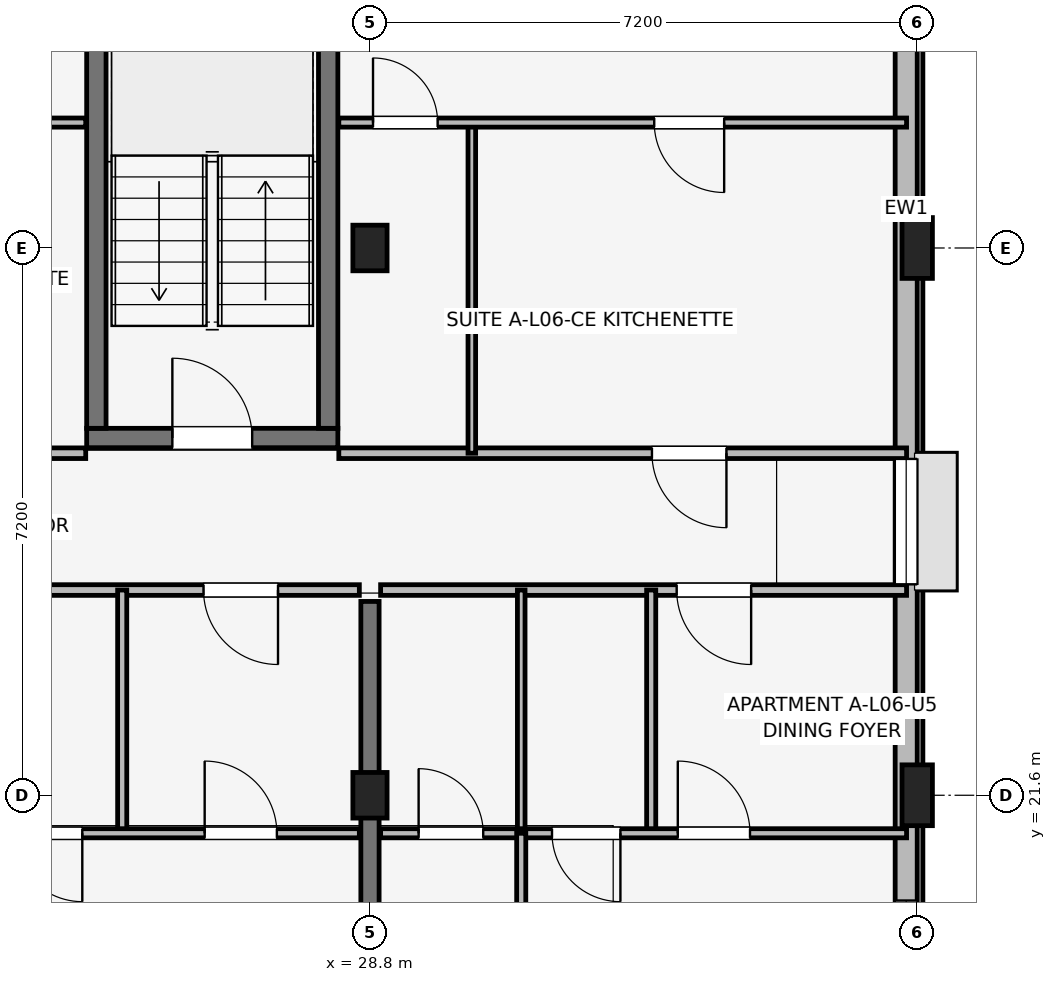
"""IFC4 building model, lengths in metres.
Left out: names, types, materials, properties, quantities, classifications, styles, units other than length and angle.
Written with IfcOpenShell. Run it as: python <this file> out.ifc"""

import sys

from ifc_helpers import new_model, si_unit, direction, frame, frame_2d, origin, origin_2d, place, context, subcontext, project, spatial, rectangle, extrude, element, fill, save


model = new_model("IFC4")
c1 = context("Model", 3, precision=1e-05, world=origin(), true_north=direction((0.0, 1.0)))
c2 = subcontext(c1, "Body", "Model", "MODEL_VIEW")
j1 = project(units=[si_unit("LENGTHUNIT", "METRE"), si_unit("PLANEANGLEUNIT", "RADIAN")], contexts=[c1])
p1 = place(None, origin())
s1 = spatial("IfcSite", under=j1, at=p1, CompositionType="ELEMENT")
p2 = place(p1, origin())
s2 = spatial("IfcBuilding", under=s1, at=p2, CompositionType="ELEMENT")
p3 = place(p2, frame((0.0, 0.0, 21.3)))
s3 = spatial("IfcBuildingStorey", under=s2, at=p3, CompositionType="ELEMENT", Elevation=21.3)
for number, where, z_axis, x_axis in (
    (1, (28.8, 21.6, 0.0), (0.0, 0.0, 1.0), (1.0, 0.0, 0.0)),
    (2, (28.8, 28.8, 0.0), (0.0, 0.0, 1.0), (1.0, 0.0, 0.0)),
):
    element("IfcColumn", number, at=place(p3, frame(where, z_axis=z_axis, x_axis=x_axis)), inside=s3, PredefinedType="COLUMN", context=c2, shape_type="SweptSolid", body=[
        extrude(rectangle(XDim=0.45, YDim=0.6, at=origin_2d()), origin(), (0.0, 0.0, 1.0), 3.15),
    ])
for number, where, z_axis, x_axis in (
    (3, (36.0, 21.6, 0.0), (0.0, 0.0, 1.0), (1.0, 0.0, 0.0)),
    (4, (36.0, 28.8, 0.0), (0.0, 0.0, 1.0), (1.0, 0.0, 0.0)),
):
    element("IfcColumn", number, at=place(p3, frame(where, z_axis=z_axis, x_axis=x_axis)), inside=s3, PredefinedType="COLUMN", context=c2, shape_type="SweptSolid", body=[
        extrude(rectangle(XDim=0.4, YDim=0.8, at=origin_2d()), origin(), (0.0, 0.0, 1.0), 3.15),
    ])
p4 = place(p3, frame((25.073, 26.3, 0.0), z_axis=(0.0, 0.0, 1.0), x_axis=(1.0, 0.0, 0.0)))
e5 = element("IfcWall", 5, at=p4, inside=s3, PredefinedType="SHEAR", context=c2, shape_type="SweptSolid", body=[
    extrude(rectangle(XDim=3.305, YDim=0.255, at=frame_2d((1.652, 0.0))), origin(), (0.0, 0.0, 1.0), 3.15),
])
p5 = place(p4, frame((1.127, 0.0, 0.0)))
e6 = element("IfcOpeningElement", 6, at=p5, cuts=e5, PredefinedType="OPENING", context=c2, shape_type="SweptSolid", body=[
    extrude(rectangle(XDim=1.05, YDim=2.12, at=frame_2d((0.525, 1.06))), frame((0.0, 0.137, 0.0), z_axis=(0.0, -1.0, 0.0), x_axis=(1.0, 0.0, 0.0)), (0.0, 0.0, 1.0), 0.275),
])
for number, where, z_axis, x_axis in (
    (7, (25.2, 26.427, 0.0), (0.0, 0.0, 1.0), (0.0, 1.0, 0.0)),
    (8, (28.25, 26.427, 0.0), (0.0, 0.0, 1.0), (0.0, 1.0, 0.0)),
):
    element("IfcWall", number, at=place(p3, frame(where, z_axis=z_axis, x_axis=x_axis)), inside=s3, PredefinedType="SHEAR", context=c2, shape_type="SweptSolid", body=[
        extrude(rectangle(XDim=6.295, YDim=0.255, at=frame_2d((3.147, 0.0))), origin(), (0.0, 0.0, 1.0), 3.15),
    ])
p6 = place(p3, frame((28.8, 14.75, 0.0), z_axis=(0.0, 0.0, 1.0), x_axis=(0.0, 1.0, 0.0)))
e9 = element("IfcWall", 9, at=p6, inside=s3, PredefinedType="SHEAR", context=c2, shape_type="SweptSolid", body=[
    extrude(rectangle(XDim=9.4, YDim=0.24, at=frame_2d((4.7, 0.0))), origin(), (0.0, 0.0, 1.0), 3.15),
])
p7 = place(p3, frame((35.855, 17.8, 0.0), z_axis=(0.0, 0.0, 1.0), x_axis=(0.0, 1.0, 0.0)))
e10 = element("IfcWall", 10, at=p7, inside=s3, PredefinedType="SOLIDWALL", context=c2, shape_type="SweptSolid", body=[
    extrude(rectangle(XDim=14.8, YDim=0.29, at=frame_2d((7.4, 0.0))), origin(), (0.0, 0.0, 1.0), 2.43),
])
p8 = place(p7, frame((6.575, 0.0, 1.05)))
e11 = element("IfcOpeningElement", 11, at=p8, cuts=e10, PredefinedType="OPENING", context=c2, shape_type="SweptSolid", body=[
    extrude(rectangle(XDim=1.65, YDim=1.15, at=frame_2d((0.825, 0.575))), frame((0.0, 0.155, 0.0), z_axis=(0.0, -1.0, 0.0), x_axis=(1.0, 0.0, 0.0)), (0.0, 0.0, 1.0), 0.31),
])
p9 = place(p7, frame((1.115, 0.0, 0.75)))
e12 = element("IfcOpeningElement", 12, at=p9, cuts=e10, PredefinedType="OPENING", context=c2, shape_type="SweptSolid", body=[
    extrude(rectangle(XDim=1.3, YDim=1.55, at=frame_2d((0.65, 0.775))), frame((0.0, 0.155, 0.0), z_axis=(0.0, -1.0, 0.0), x_axis=(1.0, 0.0, 0.0)), (0.0, 0.0, 1.0), 0.31),
])
p10 = place(p3, frame((21.74, 24.3, 0.0), z_axis=(0.0, 0.0, 1.0), x_axis=(1.0, 0.0, 0.0)))
e13 = element("IfcWall", 13, at=p10, inside=s3, PredefinedType="PARTITIONING", context=c2, shape_type="SweptSolid", body=[
    extrude(rectangle(XDim=6.92, YDim=0.14, at=frame_2d((3.46, 0.0))), origin(), (0.0, 0.0, 1.0), 2.38),
])
p11 = place(p10, frame((5.85, 0.0, 0.0), z_axis=(0.0, 0.0, 1.0), x_axis=(-1.0, 0.0, 0.0)))
e14 = element("IfcOpeningElement", 14, at=p11, cuts=e13, PredefinedType="OPENING", context=c2, shape_type="SweptSolid", body=[
    extrude(rectangle(XDim=0.98, YDim=2.1, at=frame_2d((0.49, 1.05))), frame((0.0, 0.08, 0.0), z_axis=(0.0, -1.0, 0.0), x_axis=(1.0, 0.0, 0.0)), (0.0, 0.0, 1.0), 0.16),
])
p12 = place(p3, frame((25.54, 21.1, 0.0), z_axis=(0.0, 0.0, 1.0), x_axis=(0.0, 1.0, 0.0)))
e15 = element("IfcWall", 15, at=p12, inside=s3, PredefinedType="PARTITIONING", context=c2, shape_type="SweptSolid", body=[
    extrude(rectangle(XDim=3.2, YDim=0.12, at=frame_2d((1.6, 0.0))), origin(), (0.0, 0.0, 1.0), 2.38),
])
p13 = place(p3, frame((21.74, 21.1, 0.0), z_axis=(0.0, 0.0, 1.0), x_axis=(1.0, 0.0, 0.0)))
e16 = element("IfcWall", 16, at=p13, inside=s3, PredefinedType="PARTITIONING", context=c2, shape_type="SweptSolid", body=[
    extrude(rectangle(XDim=6.92, YDim=0.12, at=frame_2d((3.46, 0.0))), origin(), (0.0, 0.0, 1.0), 2.38),
])
p14 = place(p13, frame((0.5, 0.0, 0.0)))
e17 = element("IfcOpeningElement", 17, at=p14, cuts=e16, PredefinedType="OPENING", context=c2, shape_type="SweptSolid", body=[
    extrude(rectangle(XDim=0.85, YDim=2.08, at=frame_2d((0.425, 1.04))), frame((0.0, 0.07, 0.0), z_axis=(0.0, -1.0, 0.0), x_axis=(1.0, 0.0, 0.0)), (0.0, 0.0, 1.0), 0.14),
])
p15 = place(p13, frame((3.275, 0.0, 0.0), z_axis=(0.0, 0.0, 1.0), x_axis=(-1.0, 0.0, 0.0)))
e18 = element("IfcOpeningElement", 18, at=p15, cuts=e16, PredefinedType="OPENING", context=c2, shape_type="SweptSolid", body=[
    extrude(rectangle(XDim=0.9, YDim=2.08, at=frame_2d((0.45, 1.04))), frame((0.0, 0.07, 0.0), z_axis=(0.0, -1.0, 0.0), x_axis=(1.0, 0.0, 0.0)), (0.0, 0.0, 1.0), 0.14),
])
p16 = place(p13, frame((4.885, 0.0, 0.0)))
e19 = element("IfcOpeningElement", 19, at=p16, cuts=e16, PredefinedType="OPENING", context=c2, shape_type="SweptSolid", body=[
    extrude(rectangle(XDim=0.95, YDim=2.08, at=frame_2d((0.475, 1.04))), frame((0.0, 0.07, 0.0), z_axis=(0.0, -1.0, 0.0), x_axis=(1.0, 0.0, 0.0)), (0.0, 0.0, 1.0), 0.14),
])
p17 = place(p3, frame((28.94, 24.3, 0.0), z_axis=(0.0, 0.0, 1.0), x_axis=(1.0, 0.0, 0.0)))
e20 = element("IfcWall", 20, at=p17, inside=s3, PredefinedType="PARTITIONING", context=c2, shape_type="SweptSolid", body=[
    extrude(rectangle(XDim=6.92, YDim=0.14, at=frame_2d((3.46, 0.0))), origin(), (0.0, 0.0, 1.0), 2.38),
])
p18 = place(p17, frame((4.875, 0.0, 0.0), z_axis=(0.0, 0.0, 1.0), x_axis=(-1.0, 0.0, 0.0)))
e21 = element("IfcOpeningElement", 21, at=p18, cuts=e20, PredefinedType="OPENING", context=c2, shape_type="SweptSolid", body=[
    extrude(rectangle(XDim=0.98, YDim=2.1, at=frame_2d((0.49, 1.05))), frame((0.0, 0.08, 0.0), z_axis=(0.0, -1.0, 0.0), x_axis=(1.0, 0.0, 0.0)), (0.0, 0.0, 1.0), 0.16),
])
p19 = place(p3, frame((30.79, 21.1, 0.0), z_axis=(0.0, 0.0, 1.0), x_axis=(0.0, 1.0, 0.0)))
e22 = element("IfcWall", 22, at=p19, inside=s3, PredefinedType="PARTITIONING", context=c2, shape_type="SweptSolid", body=[
    extrude(rectangle(XDim=3.2, YDim=0.1, at=frame_2d((1.6, 0.0))), origin(), (0.0, 0.0, 1.0), 2.38),
])
p20 = place(p3, frame((32.5, 21.1, 0.0), z_axis=(0.0, 0.0, 1.0), x_axis=(0.0, 1.0, 0.0)))
e23 = element("IfcWall", 23, at=p20, inside=s3, PredefinedType="PARTITIONING", context=c2, shape_type="SweptSolid", body=[
    extrude(rectangle(XDim=3.2, YDim=0.12, at=frame_2d((1.6, 0.0))), origin(), (0.0, 0.0, 1.0), 2.38),
])
p21 = place(p3, frame((28.94, 21.1, 0.0), z_axis=(0.0, 0.0, 1.0), x_axis=(1.0, 0.0, 0.0)))
e24 = element("IfcWall", 24, at=p21, inside=s3, PredefinedType="PARTITIONING", context=c2, shape_type="SweptSolid", body=[
    extrude(rectangle(XDim=6.92, YDim=0.12, at=frame_2d((3.46, 0.0))), origin(), (0.0, 0.0, 1.0), 2.38),
])
p22 = place(p21, frame((0.5, 0.0, 0.0)))
e25 = element("IfcOpeningElement", 25, at=p22, cuts=e24, PredefinedType="OPENING", context=c2, shape_type="SweptSolid", body=[
    extrude(rectangle(XDim=0.85, YDim=2.08, at=frame_2d((0.425, 1.04))), frame((0.0, 0.07, 0.0), z_axis=(0.0, -1.0, 0.0), x_axis=(1.0, 0.0, 0.0)), (0.0, 0.0, 1.0), 0.14),
])
p23 = place(p21, frame((3.155, 0.0, 0.0), z_axis=(0.0, 0.0, 1.0), x_axis=(-1.0, 0.0, 0.0)))
e26 = element("IfcOpeningElement", 26, at=p23, cuts=e24, PredefinedType="OPENING", context=c2, shape_type="SweptSolid", body=[
    extrude(rectangle(XDim=0.9, YDim=2.08, at=frame_2d((0.45, 1.04))), frame((0.0, 0.07, 0.0), z_axis=(0.0, -1.0, 0.0), x_axis=(1.0, 0.0, 0.0)), (0.0, 0.0, 1.0), 0.14),
])
p24 = place(p21, frame((3.91, 0.0, 0.0)))
e27 = element("IfcOpeningElement", 27, at=p24, cuts=e24, PredefinedType="OPENING", context=c2, shape_type="SweptSolid", body=[
    extrude(rectangle(XDim=0.95, YDim=2.08, at=frame_2d((0.475, 1.04))), frame((0.0, 0.07, 0.0), z_axis=(0.0, -1.0, 0.0), x_axis=(1.0, 0.0, 0.0)), (0.0, 0.0, 1.0), 0.14),
])
p25 = place(p3, frame((30.79, 14.7, 0.0), z_axis=(0.0, 0.0, 1.0), x_axis=(0.0, 1.0, 0.0)))
e28 = element("IfcWall", 28, at=p25, inside=s3, PredefinedType="PARTITIONING", context=c2, shape_type="SweptSolid", body=[
    extrude(rectangle(XDim=6.4, YDim=0.12, at=frame_2d((3.2, 0.0))), origin(), (0.0, 0.0, 1.0), 2.38),
])
p26 = place(p25, frame((3.65, 0.0, 0.0), z_axis=(0.0, 0.0, 1.0), x_axis=(-1.0, 0.0, 0.0)))
e29 = element("IfcOpeningElement", 29, at=p26, cuts=e28, PredefinedType="OPENING", context=c2, shape_type="SweptSolid", body=[
    extrude(rectangle(XDim=0.9, YDim=2.08, at=frame_2d((0.45, 1.04))), frame((0.0, 0.07, 0.0), z_axis=(0.0, -1.0, 0.0), x_axis=(1.0, 0.0, 0.0)), (0.0, 0.0, 1.0), 0.14),
])
p27 = place(p3, frame((21.34, 26.1, 0.0), z_axis=(0.0, 0.0, 1.0), x_axis=(1.0, 0.0, 0.0)))
e30 = element("IfcWall", 30, at=p27, inside=s3, PredefinedType="PARTITIONING", context=c2, shape_type="SweptSolid", body=[
    extrude(rectangle(XDim=3.72, YDim=0.14, at=frame_2d((1.86, 0.0))), origin(), (0.0, 0.0, 1.0), 2.38),
])
p28 = place(p27, frame((2.151, 0.0, 0.0)))
e31 = element("IfcOpeningElement", 31, at=p28, cuts=e30, PredefinedType="OPENING", context=c2, shape_type="SweptSolid", body=[
    extrude(rectangle(XDim=0.98, YDim=2.1, at=frame_2d((0.49, 1.05))), frame((0.0, 0.08, 0.0), z_axis=(0.0, -1.0, 0.0), x_axis=(1.0, 0.0, 0.0)), (0.0, 0.0, 1.0), 0.16),
])
p29 = place(p3, frame((21.34, 30.45, 0.0), z_axis=(0.0, 0.0, 1.0), x_axis=(1.0, 0.0, 0.0)))
e32 = element("IfcWall", 32, at=p29, inside=s3, PredefinedType="PARTITIONING", context=c2, shape_type="SweptSolid", body=[
    extrude(rectangle(XDim=3.72, YDim=0.12, at=frame_2d((1.86, 0.0))), origin(), (0.0, 0.0, 1.0), 2.38),
])
p30 = place(p29, frame((1.206, 0.0, 0.0), z_axis=(0.0, 0.0, 1.0), x_axis=(-1.0, 0.0, 0.0)))
e33 = element("IfcOpeningElement", 33, at=p30, cuts=e32, PredefinedType="OPENING", context=c2, shape_type="SweptSolid", body=[
    extrude(rectangle(XDim=0.85, YDim=2.08, at=frame_2d((0.425, 1.04))), frame((0.0, 0.07, 0.0), z_axis=(0.0, -1.0, 0.0), x_axis=(1.0, 0.0, 0.0)), (0.0, 0.0, 1.0), 0.14),
])
p31 = place(p29, frame((2.181, 0.0, 0.0)))
e34 = element("IfcOpeningElement", 34, at=p31, cuts=e32, PredefinedType="OPENING", context=c2, shape_type="SweptSolid", body=[
    extrude(rectangle(XDim=0.92, YDim=2.08, at=frame_2d((0.46, 1.04))), frame((0.0, 0.07, 0.0), z_axis=(0.0, -1.0, 0.0), x_axis=(1.0, 0.0, 0.0)), (0.0, 0.0, 1.0), 0.14),
])
p32 = place(p3, frame((28.39, 26.1, 0.0), z_axis=(0.0, 0.0, 1.0), x_axis=(1.0, 0.0, 0.0)))
e35 = element("IfcWall", 35, at=p32, inside=s3, PredefinedType="PARTITIONING", context=c2, shape_type="SweptSolid", body=[
    extrude(rectangle(XDim=7.47, YDim=0.14, at=frame_2d((3.735, 0.0))), origin(), (0.0, 0.0, 1.0), 2.38),
])
p33 = place(p32, frame((5.1, 0.0, 0.0), z_axis=(0.0, 0.0, 1.0), x_axis=(-1.0, 0.0, 0.0)))
e36 = element("IfcOpeningElement", 36, at=p33, cuts=e35, PredefinedType="OPENING", context=c2, shape_type="SweptSolid", body=[
    extrude(rectangle(XDim=0.98, YDim=2.1, at=frame_2d((0.49, 1.05))), frame((0.0, 0.08, 0.0), z_axis=(0.0, -1.0, 0.0), x_axis=(1.0, 0.0, 0.0)), (0.0, 0.0, 1.0), 0.16),
])
p34 = place(p3, frame((30.14, 26.1, 0.0), z_axis=(0.0, 0.0, 1.0), x_axis=(0.0, 1.0, 0.0)))
e37 = element("IfcWall", 37, at=p34, inside=s3, PredefinedType="PARTITIONING", context=c2, shape_type="SweptSolid", body=[
    extrude(rectangle(XDim=4.35, YDim=0.1, at=frame_2d((2.175, 0.0))), origin(), (0.0, 0.0, 1.0), 2.38),
])
p35 = place(p3, frame((28.39, 30.45, 0.0), z_axis=(0.0, 0.0, 1.0), x_axis=(1.0, 0.0, 0.0)))
e38 = element("IfcWall", 38, at=p35, inside=s3, PredefinedType="PARTITIONING", context=c2, shape_type="SweptSolid", body=[
    extrude(rectangle(XDim=7.47, YDim=0.12, at=frame_2d((3.735, 0.0))), origin(), (0.0, 0.0, 1.0), 2.38),
])
p36 = place(p35, frame((0.45, 0.0, 0.0)))
e39 = element("IfcOpeningElement", 39, at=p36, cuts=e38, PredefinedType="OPENING", context=c2, shape_type="SweptSolid", body=[
    extrude(rectangle(XDim=0.85, YDim=2.08, at=frame_2d((0.425, 1.04))), frame((0.0, 0.07, 0.0), z_axis=(0.0, -1.0, 0.0), x_axis=(1.0, 0.0, 0.0)), (0.0, 0.0, 1.0), 0.14),
])
p37 = place(p35, frame((5.07, 0.0, 0.0), z_axis=(0.0, 0.0, 1.0), x_axis=(-1.0, 0.0, 0.0)))
e40 = element("IfcOpeningElement", 40, at=p37, cuts=e38, PredefinedType="OPENING", context=c2, shape_type="SweptSolid", body=[
    extrude(rectangle(XDim=0.92, YDim=2.08, at=frame_2d((0.46, 1.04))), frame((0.0, 0.07, 0.0), z_axis=(0.0, -1.0, 0.0), x_axis=(1.0, 0.0, 0.0)), (0.0, 0.0, 1.0), 0.14),
])
p38 = place(p8, origin())
e41 = element("IfcWindow", 41, at=p38, inside=s3, PartitioningType="SINGLE_PANEL", PredefinedType="WINDOW", context=c2, shape_type="SweptSolid", body=[
    extrude(rectangle(XDim=1.65, YDim=1.15, at=frame_2d((0.825, 0.575))), frame((0.0, 0.03, 0.0), z_axis=(0.0, -1.0, 0.0), x_axis=(1.0, 0.0, 0.0)), (0.0, 0.0, 1.0), 0.06),
])
fill(e11, e41)
p39 = place(p9, origin())
e42 = element("IfcWindow", 42, at=p39, inside=s3, PartitioningType="SINGLE_PANEL", PredefinedType="WINDOW", context=c2, shape_type="SweptSolid", body=[
    extrude(rectangle(XDim=1.3, YDim=1.55, at=frame_2d((0.65, 0.775))), frame((0.0, 0.03, 0.0), z_axis=(0.0, -1.0, 0.0), x_axis=(1.0, 0.0, 0.0)), (0.0, 0.0, 1.0), 0.06),
])
fill(e12, e42)
p40 = place(p11, origin())
e43 = element("IfcDoor", 43, at=p40, inside=s3, OperationType="SINGLE_SWING_RIGHT", PredefinedType="DOOR", context=c2, shape_type="SweptSolid", body=[
    extrude(rectangle(XDim=0.98, YDim=2.1, at=frame_2d((0.49, 1.05))), frame((0.0, 0.025, 0.0), z_axis=(0.0, -1.0, 0.0), x_axis=(1.0, 0.0, 0.0)), (0.0, 0.0, 1.0), 0.05),
])
fill(e14, e43)
p41 = place(p15, origin())
e44 = element("IfcDoor", 44, at=p41, inside=s3, OperationType="SINGLE_SWING_RIGHT", PredefinedType="DOOR", context=c2, shape_type="SweptSolid", body=[
    extrude(rectangle(XDim=0.9, YDim=2.08, at=frame_2d((0.45, 1.04))), frame((0.0, 0.025, 0.0), z_axis=(0.0, -1.0, 0.0), x_axis=(1.0, 0.0, 0.0)), (0.0, 0.0, 1.0), 0.05),
])
fill(e18, e44)
p42 = place(p16, origin())
e45 = element("IfcDoor", 45, at=p42, inside=s3, OperationType="SINGLE_SWING_LEFT", PredefinedType="DOOR", context=c2, shape_type="SweptSolid", body=[
    extrude(rectangle(XDim=0.95, YDim=2.08, at=frame_2d((0.475, 1.04))), frame((0.0, 0.025, 0.0), z_axis=(0.0, -1.0, 0.0), x_axis=(1.0, 0.0, 0.0)), (0.0, 0.0, 1.0), 0.05),
])
fill(e19, e45)
p43 = place(p18, origin())
e46 = element("IfcDoor", 46, at=p43, inside=s3, OperationType="SINGLE_SWING_RIGHT", PredefinedType="DOOR", context=c2, shape_type="SweptSolid", body=[
    extrude(rectangle(XDim=0.98, YDim=2.1, at=frame_2d((0.49, 1.05))), frame((0.0, 0.025, 0.0), z_axis=(0.0, -1.0, 0.0), x_axis=(1.0, 0.0, 0.0)), (0.0, 0.0, 1.0), 0.05),
])
fill(e21, e46)
p44 = place(p22, origin())
e47 = element("IfcDoor", 47, at=p44, inside=s3, OperationType="SINGLE_SWING_LEFT", PredefinedType="DOOR", context=c2, shape_type="SweptSolid", body=[
    extrude(rectangle(XDim=0.85, YDim=2.08, at=frame_2d((0.425, 1.04))), frame((0.0, 0.025, 0.0), z_axis=(0.0, -1.0, 0.0), x_axis=(1.0, 0.0, 0.0)), (0.0, 0.0, 1.0), 0.05),
])
fill(e25, e47)
p45 = place(p23, origin())
e48 = element("IfcDoor", 48, at=p45, inside=s3, OperationType="SINGLE_SWING_RIGHT", PredefinedType="DOOR", context=c2, shape_type="SweptSolid", body=[
    extrude(rectangle(XDim=0.9, YDim=2.08, at=frame_2d((0.45, 1.04))), frame((0.0, 0.025, 0.0), z_axis=(0.0, -1.0, 0.0), x_axis=(1.0, 0.0, 0.0)), (0.0, 0.0, 1.0), 0.05),
])
fill(e26, e48)
p46 = place(p24, origin())
e49 = element("IfcDoor", 49, at=p46, inside=s3, OperationType="SINGLE_SWING_LEFT", PredefinedType="DOOR", context=c2, shape_type="SweptSolid", body=[
    extrude(rectangle(XDim=0.95, YDim=2.08, at=frame_2d((0.475, 1.04))), frame((0.0, 0.025, 0.0), z_axis=(0.0, -1.0, 0.0), x_axis=(1.0, 0.0, 0.0)), (0.0, 0.0, 1.0), 0.05),
])
fill(e27, e49)
p47 = place(p33, origin())
e50 = element("IfcDoor", 50, at=p47, inside=s3, OperationType="SINGLE_SWING_RIGHT", PredefinedType="DOOR", context=c2, shape_type="SweptSolid", body=[
    extrude(rectangle(XDim=0.98, YDim=2.1, at=frame_2d((0.49, 1.05))), frame((0.0, 0.025, 0.0), z_axis=(0.0, -1.0, 0.0), x_axis=(1.0, 0.0, 0.0)), (0.0, 0.0, 1.0), 0.05),
])
fill(e36, e50)
p48 = place(p36, origin())
e51 = element("IfcDoor", 51, at=p48, inside=s3, OperationType="SINGLE_SWING_LEFT", PredefinedType="DOOR", context=c2, shape_type="SweptSolid", body=[
    extrude(rectangle(XDim=0.85, YDim=2.08, at=frame_2d((0.425, 1.04))), frame((0.0, 0.025, 0.0), z_axis=(0.0, -1.0, 0.0), x_axis=(1.0, 0.0, 0.0)), (0.0, 0.0, 1.0), 0.05),
])
fill(e39, e51)
p49 = place(p37, origin())
e52 = element("IfcDoor", 52, at=p49, inside=s3, OperationType="SINGLE_SWING_RIGHT", PredefinedType="DOOR", context=c2, shape_type="SweptSolid", body=[
    extrude(rectangle(XDim=0.92, YDim=2.08, at=frame_2d((0.46, 1.04))), frame((0.0, 0.025, 0.0), z_axis=(0.0, -1.0, 0.0), x_axis=(1.0, 0.0, 0.0)), (0.0, 0.0, 1.0), 0.05),
])
fill(e40, e52)
p50 = place(p5, origin())
e53 = element("IfcDoor", 53, at=p50, inside=s3, OperationType="SINGLE_SWING_LEFT", PredefinedType="DOOR", context=c2, shape_type="SweptSolid", body=[
    extrude(rectangle(XDim=1.05, YDim=2.12, at=frame_2d((0.525, 1.06))), frame((0.0, 0.025, 0.0), z_axis=(0.0, -1.0, 0.0), x_axis=(1.0, 0.0, 0.0)), (0.0, 0.0, 1.0), 0.05),
])
fill(e6, e53)
save(model, sys.argv[1])
